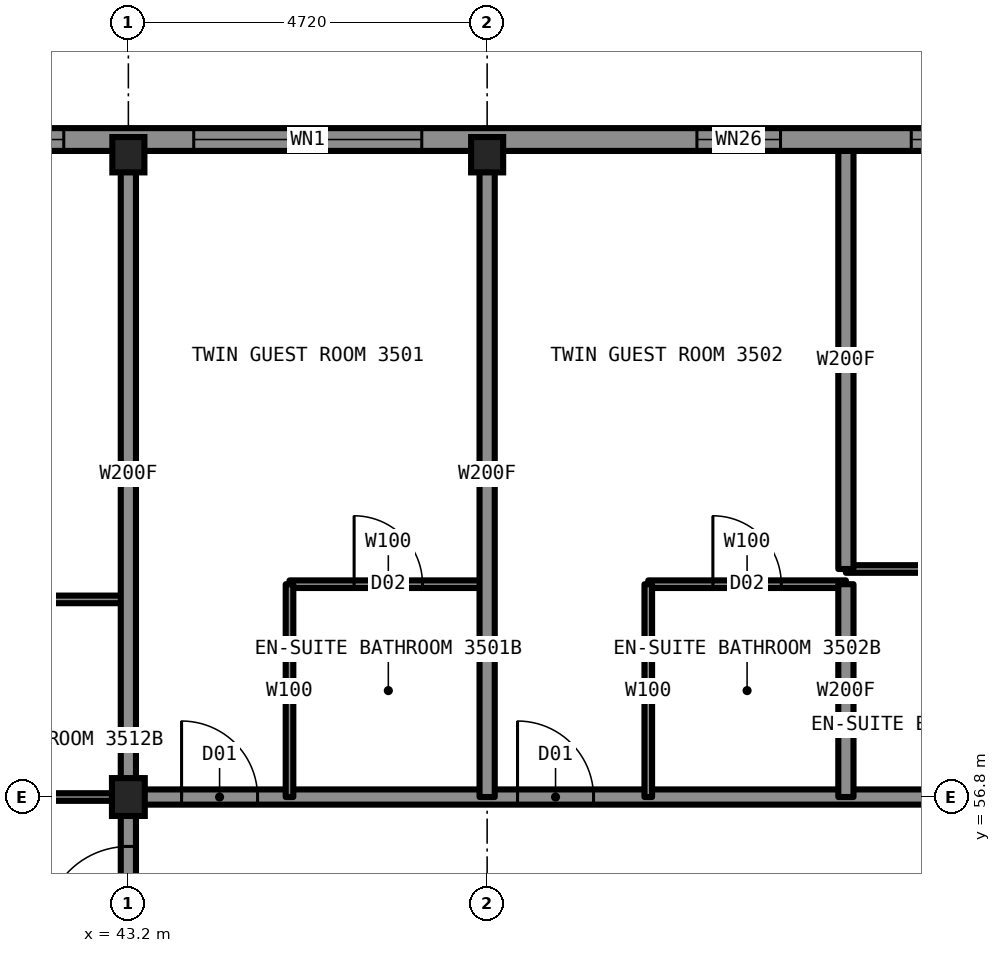
"""IFC4 building model, lengths in metres.
Left out: names, types, materials, properties, quantities, classifications, styles, units other than length and angle.
Written with IfcOpenShell. Run it as: python <this file> out.ifc"""

import sys

from ifc_helpers import new_model, si_unit, direction, frame, frame_2d, origin, origin_2d, place, context, subcontext, project, spatial, rectangle, i_section, extrude, element, fill, save


model = new_model("IFC4")
c1 = context("Model", 3, precision=1e-05, world=origin(), true_north=direction((0.0, 1.0)))
c2 = subcontext(c1, "Body", "Model", "MODEL_VIEW")
j1 = project(units=[si_unit("LENGTHUNIT", "METRE"), si_unit("PLANEANGLEUNIT", "RADIAN")], contexts=[c1])
p1 = place(None, origin())
s1 = spatial("IfcSite", under=j1, at=p1, CompositionType="ELEMENT")
p2 = place(p1, origin())
s2 = spatial("IfcBuilding", under=s1, at=p2, CompositionType="ELEMENT")
p3 = place(p2, frame((0.0, 0.0, 124.9)))
s3 = spatial("IfcBuildingStorey", under=s2, at=p3, CompositionType="ELEMENT", Elevation=124.9)
for number, where, z_axis, x_axis in (
    (1, (43.2, 65.25, 0.0), (0.0, 0.0, 1.0), (1.0, 0.0, 0.0)),
    (2, (47.92, 65.25, 0.0), (0.0, 0.0, 1.0), (1.0, 0.0, 0.0)),
):
    element("IfcColumn", number, at=place(p3, frame(where, z_axis=z_axis, x_axis=x_axis)), inside=s3, PredefinedType="COLUMN", context=c2, shape_type="SweptSolid", body=[
        extrude(i_section(OverallWidth=0.422, OverallDepth=0.465, WebThickness=0.045, FlangeThickness=0.073, at=origin_2d()), origin(), (0.0, 0.0, 1.0), 3.5),
    ])
p4 = place(p3, frame((43.2, 56.8, 0.0), z_axis=(0.0, 0.0, 1.0), x_axis=(1.0, 0.0, 0.0)))
e3 = element("IfcColumn", 3, at=p4, inside=s3, PredefinedType="COLUMN", context=c2, shape_type="SweptSolid", body=[
    extrude(i_section(OverallWidth=0.432, OverallDepth=0.498, WebThickness=0.056, FlangeThickness=0.089, at=origin_2d()), origin(), (0.0, 0.0, 1.0), 3.5),
])
p5 = place(p3, frame((40.6, 56.8, 0.0), z_axis=(0.0, 0.0, 1.0), x_axis=(1.0, 0.0, 0.0)))
e4 = element("IfcWall", 4, at=p5, inside=s3, PredefinedType="PARTITIONING", context=c2, shape_type="SweptSolid", body=[
    extrude(rectangle(XDim=2.6, YDim=0.1, at=frame_2d((1.3, 0.0))), origin(), (0.0, 0.0, 1.0), 2.573),
])
p6 = place(p3, frame((43.2, 56.8, 0.0), z_axis=(0.0, 0.0, 1.0), x_axis=(1.0, 0.0, 0.0)))
e5 = element("IfcWall", 5, at=p6, inside=s3, PredefinedType="PARTITIONING", context=c2, shape_type="SweptSolid", body=[
    extrude(rectangle(XDim=23.6, YDim=0.2, at=frame_2d((11.8, 0.0))), origin(), (0.0, 0.0, 1.0), 3.33),
])
p7 = place(p6, frame((0.7, 0.0, 0.0)))
e6 = element("IfcOpeningElement", 6, at=p7, cuts=e5, PredefinedType="OPENING", context=c2, shape_type="SweptSolid", body=[
    extrude(rectangle(XDim=1.0, YDim=2.2, at=frame_2d((0.5, 1.1))), frame((0.0, 0.11, 0.0), z_axis=(0.0, -1.0, 0.0), x_axis=(1.0, 0.0, 0.0)), (0.0, 0.0, 1.0), 0.22),
])
p8 = place(p6, frame((5.12, 0.0, 0.0)))
e7 = element("IfcOpeningElement", 7, at=p8, cuts=e5, PredefinedType="OPENING", context=c2, shape_type="SweptSolid", body=[
    extrude(rectangle(XDim=1.0, YDim=2.2, at=frame_2d((0.5, 1.1))), frame((0.0, 0.11, 0.0), z_axis=(0.0, -1.0, 0.0), x_axis=(1.0, 0.0, 0.0)), (0.0, 0.0, 1.0), 0.22),
])
p9 = place(p6, frame((12.44, 0.0, 0.0)))
e8 = element("IfcOpeningElement", 8, at=p9, cuts=e5, PredefinedType="OPENING", context=c2, shape_type="SweptSolid", body=[
    extrude(rectangle(XDim=1.0, YDim=2.2, at=frame_2d((0.5, 1.1))), frame((0.0, 0.11, 0.0), z_axis=(0.0, -1.0, 0.0), x_axis=(1.0, 0.0, 0.0)), (0.0, 0.0, 1.0), 0.22),
])
p10 = place(p6, frame((21.14, 0.0, 0.0)))
e9 = element("IfcOpeningElement", 9, at=p10, cuts=e5, PredefinedType="OPENING", context=c2, shape_type="SweptSolid", body=[
    extrude(rectangle(XDim=1.0, YDim=2.2, at=frame_2d((0.5, 1.1))), frame((0.0, 0.11, 0.0), z_axis=(0.0, -1.0, 0.0), x_axis=(1.0, 0.0, 0.0)), (0.0, 0.0, 1.0), 0.22),
])
p11 = place(p3, frame((40.6, 59.4, 0.0), z_axis=(0.0, 0.0, 1.0), x_axis=(1.0, 0.0, 0.0)))
e10 = element("IfcWall", 10, at=p11, inside=s3, PredefinedType="PARTITIONING", context=c2, shape_type="SweptSolid", body=[
    extrude(rectangle(XDim=2.6, YDim=0.1, at=frame_2d((1.3, 0.0))), origin(), (0.0, 0.0, 1.0), 3.33),
])
p12 = place(p3, frame((45.32, 59.6, 0.0), z_axis=(0.0, 0.0, 1.0), x_axis=(1.0, 0.0, 0.0)))
e11 = element("IfcWall", 11, at=p12, inside=s3, PredefinedType="PARTITIONING", context=c2, shape_type="SweptSolid", body=[
    extrude(rectangle(XDim=2.6, YDim=0.1, at=frame_2d((1.3, 0.0))), origin(), (0.0, 0.0, 1.0), 3.33),
])
p13 = place(p12, frame((0.85, 0.0, 0.0)))
e12 = element("IfcOpeningElement", 12, at=p13, cuts=e11, PredefinedType="OPENING", context=c2, shape_type="SweptSolid", body=[
    extrude(rectangle(XDim=0.9, YDim=2.1, at=frame_2d((0.45, 1.05))), frame((0.0, 0.06, 0.0), z_axis=(0.0, -1.0, 0.0), x_axis=(1.0, 0.0, 0.0)), (0.0, 0.0, 1.0), 0.12),
])
p14 = place(p3, frame((50.04, 59.6, 0.0), z_axis=(0.0, 0.0, 1.0), x_axis=(1.0, 0.0, 0.0)))
e13 = element("IfcWall", 13, at=p14, inside=s3, PredefinedType="PARTITIONING", context=c2, shape_type="SweptSolid", body=[
    extrude(rectangle(XDim=2.6, YDim=0.1, at=frame_2d((1.3, 0.0))), origin(), (0.0, 0.0, 1.0), 3.33),
])
p15 = place(p14, frame((0.85, 0.0, 0.0)))
e14 = element("IfcOpeningElement", 14, at=p15, cuts=e13, PredefinedType="OPENING", context=c2, shape_type="SweptSolid", body=[
    extrude(rectangle(XDim=0.9, YDim=2.1, at=frame_2d((0.45, 1.05))), frame((0.0, 0.06, 0.0), z_axis=(0.0, -1.0, 0.0), x_axis=(1.0, 0.0, 0.0)), (0.0, 0.0, 1.0), 0.12),
])
p16 = place(p3, frame((52.64, 59.8, 0.0), z_axis=(0.0, 0.0, 1.0), x_axis=(1.0, 0.0, 0.0)))
e15 = element("IfcWall", 15, at=p16, inside=s3, PredefinedType="PARTITIONING", context=c2, shape_type="SweptSolid", body=[
    extrude(rectangle(XDim=2.6, YDim=0.1, at=frame_2d((1.3, 0.0))), origin(), (0.0, 0.0, 1.0), 3.33),
])
p17 = place(p3, frame((43.2, 33.22, 0.0), z_axis=(0.0, 0.0, 1.0), x_axis=(0.0, 1.0, 0.0)))
e16 = element("IfcWall", 16, at=p17, inside=s3, PredefinedType="PARTITIONING", context=c2, shape_type="SweptSolid", body=[
    extrude(rectangle(XDim=23.58, YDim=0.2, at=frame_2d((11.79, 0.0))), origin(), (0.0, 0.0, 1.0), 3.33),
])
p18 = place(p17, frame((6.16, 0.0, 0.0)))
e17 = element("IfcOpeningElement", 17, at=p18, cuts=e16, PredefinedType="OPENING", context=c2, shape_type="SweptSolid", body=[
    extrude(rectangle(XDim=1.0, YDim=2.2, at=frame_2d((0.5, 1.1))), frame((0.0, 0.11, 0.0), z_axis=(0.0, -1.0, 0.0), x_axis=(1.0, 0.0, 0.0)), (0.0, 0.0, 1.0), 0.22),
])
p19 = place(p17, frame((12.42, 0.0, 0.0)))
e18 = element("IfcOpeningElement", 18, at=p19, cuts=e16, PredefinedType="OPENING", context=c2, shape_type="SweptSolid", body=[
    extrude(rectangle(XDim=1.0, YDim=2.2, at=frame_2d((0.5, 1.1))), frame((0.0, 0.11, 0.0), z_axis=(0.0, -1.0, 0.0), x_axis=(1.0, 0.0, 0.0)), (0.0, 0.0, 1.0), 0.22),
])
p20 = place(p17, frame((21.83, 0.0, 0.0)))
e19 = element("IfcOpeningElement", 19, at=p20, cuts=e16, PredefinedType="OPENING", context=c2, shape_type="SweptSolid", body=[
    extrude(rectangle(XDim=1.1, YDim=2.2, at=frame_2d((0.55, 1.1))), frame((0.0, 0.11, 0.0), z_axis=(0.0, -1.0, 0.0), x_axis=(1.0, 0.0, 0.0)), (0.0, 0.0, 1.0), 0.22),
])
p21 = place(p17, frame((0.63, 0.0, 0.0)))
e20 = element("IfcOpeningElement", 20, at=p21, cuts=e16, PredefinedType="OPENING", context=c2, shape_type="SweptSolid", body=[
    extrude(rectangle(XDim=1.1, YDim=2.2, at=frame_2d((0.55, 1.1))), frame((0.0, 0.11, 0.0), z_axis=(0.0, -1.0, 0.0), x_axis=(1.0, 0.0, 0.0)), (0.0, 0.0, 1.0), 0.22),
])
p22 = place(p3, frame((43.2, 56.8, 0.0), z_axis=(0.0, 0.0, 1.0), x_axis=(0.0, 1.0, 0.0)))
e21 = element("IfcWall", 21, at=p22, inside=s3, PredefinedType="PARTITIONING", context=c2, shape_type="SweptSolid", body=[
    extrude(rectangle(XDim=8.5, YDim=0.2, at=frame_2d((4.25, 0.0))), origin(), (0.0, 0.0, 1.0), 2.573),
])
p23 = place(p3, frame((52.64, 56.8, 0.0), z_axis=(0.0, 0.0, 1.0), x_axis=(0.0, 1.0, 0.0)))
e22 = element("IfcWall", 22, at=p23, inside=s3, PredefinedType="PARTITIONING", context=c2, shape_type="SweptSolid", body=[
    extrude(rectangle(XDim=2.8, YDim=0.2, at=frame_2d((1.4, 0.0))), origin(), (0.0, 0.0, 1.0), 3.33),
])
p24 = place(p3, frame((52.64, 59.8, 0.0), z_axis=(0.0, 0.0, 1.0), x_axis=(0.0, 1.0, 0.0)))
e23 = element("IfcWall", 23, at=p24, inside=s3, PredefinedType="PARTITIONING", context=c2, shape_type="SweptSolid", body=[
    extrude(rectangle(XDim=5.5, YDim=0.2, at=frame_2d((2.75, 0.0))), origin(), (0.0, 0.0, 1.0), 3.33),
])
p25 = place(p3, frame((50.04, 56.8, 0.0), z_axis=(0.0, 0.0, 1.0), x_axis=(0.0, 1.0, 0.0)))
e24 = element("IfcWall", 24, at=p25, inside=s3, PredefinedType="PARTITIONING", context=c2, shape_type="SweptSolid", body=[
    extrude(rectangle(XDim=2.8, YDim=0.1, at=frame_2d((1.4, 0.0))), origin(), (0.0, 0.0, 1.0), 3.33),
])
p26 = place(p3, frame((47.92, 56.8, 0.0), z_axis=(0.0, 0.0, 1.0), x_axis=(0.0, 1.0, 0.0)))
e25 = element("IfcWall", 25, at=p26, inside=s3, PredefinedType="PARTITIONING", context=c2, shape_type="SweptSolid", body=[
    extrude(rectangle(XDim=8.5, YDim=0.2, at=frame_2d((4.25, 0.0))), origin(), (0.0, 0.0, 1.0), 2.573),
])
p27 = place(p3, frame((45.32, 56.8, 0.0), z_axis=(0.0, 0.0, 1.0), x_axis=(0.0, 1.0, 0.0)))
e26 = element("IfcWall", 26, at=p27, inside=s3, PredefinedType="PARTITIONING", context=c2, shape_type="SweptSolid", body=[
    extrude(rectangle(XDim=2.8, YDim=0.1, at=frame_2d((1.4, 0.0))), origin(), (0.0, 0.0, 1.0), 3.33),
])
p28 = place(p3, frame((70.1, 65.45, 0.0), z_axis=(0.0, 0.0, 1.0), x_axis=(-1.0, 0.0, 0.0)))
e27 = element("IfcWall", 27, at=p28, inside=s3, PredefinedType="SOLIDWALL", context=c2, shape_type="SweptSolid", body=[
    extrude(rectangle(XDim=30.2, YDim=0.3, at=frame_2d((15.1, 0.0))), origin(), (0.0, 0.0, 1.0), 2.83),
])
p29 = place(p28, frame((0.85, 0.0, 0.5)))
e28 = element("IfcOpeningElement", 28, at=p29, cuts=e27, PredefinedType="OPENING", context=c2, shape_type="SweptSolid", body=[
    extrude(rectangle(XDim=1.6, YDim=2.0, at=frame_2d((0.8, 1.0))), frame((0.0, 0.16, 0.0), z_axis=(0.0, -1.0, 0.0), x_axis=(1.0, 0.0, 0.0)), (0.0, 0.0, 1.0), 0.32),
])
p30 = place(p28, frame((4.16, 0.0, 0.5)))
e29 = element("IfcOpeningElement", 29, at=p30, cuts=e27, PredefinedType="OPENING", context=c2, shape_type="SweptSolid", body=[
    extrude(rectangle(XDim=3.0, YDim=2.0, at=frame_2d((1.5, 1.0))), frame((0.0, 0.16, 0.0), z_axis=(0.0, -1.0, 0.0), x_axis=(1.0, 0.0, 0.0)), (0.0, 0.0, 1.0), 0.32),
])
p31 = place(p28, frame((8.88, 0.0, 0.5)))
e30 = element("IfcOpeningElement", 30, at=p31, cuts=e27, PredefinedType="OPENING", context=c2, shape_type="SweptSolid", body=[
    extrude(rectangle(XDim=3.0, YDim=2.0, at=frame_2d((1.5, 1.0))), frame((0.0, 0.16, 0.0), z_axis=(0.0, -1.0, 0.0), x_axis=(1.0, 0.0, 0.0)), (0.0, 0.0, 1.0), 0.32),
])
p32 = place(p28, frame((18.32, 0.0, 0.5)))
e31 = element("IfcOpeningElement", 31, at=p32, cuts=e27, PredefinedType="OPENING", context=c2, shape_type="SweptSolid", body=[
    extrude(rectangle(XDim=3.0, YDim=2.0, at=frame_2d((1.5, 1.0))), frame((0.0, 0.16, 0.0), z_axis=(0.0, -1.0, 0.0), x_axis=(1.0, 0.0, 0.0)), (0.0, 0.0, 1.0), 0.32),
])
p33 = place(p28, frame((23.04, 0.0, 0.5)))
e32 = element("IfcOpeningElement", 32, at=p33, cuts=e27, PredefinedType="OPENING", context=c2, shape_type="SweptSolid", body=[
    extrude(rectangle(XDim=3.0, YDim=2.0, at=frame_2d((1.5, 1.0))), frame((0.0, 0.16, 0.0), z_axis=(0.0, -1.0, 0.0), x_axis=(1.0, 0.0, 0.0)), (0.0, 0.0, 1.0), 0.32),
])
p34 = place(p28, frame((27.75, 0.0, 0.5)))
e33 = element("IfcOpeningElement", 33, at=p34, cuts=e27, PredefinedType="OPENING", context=c2, shape_type="SweptSolid", body=[
    extrude(rectangle(XDim=1.6, YDim=2.0, at=frame_2d((0.8, 1.0))), frame((0.0, 0.16, 0.0), z_axis=(0.0, -1.0, 0.0), x_axis=(1.0, 0.0, 0.0)), (0.0, 0.0, 1.0), 0.32),
])
p35 = place(p7, origin())
e34 = element("IfcDoor", 34, at=p35, inside=s3, OperationType="SINGLE_SWING_LEFT", PredefinedType="DOOR", context=c2, shape_type="SweptSolid", body=[
    extrude(rectangle(XDim=1.0, YDim=2.2, at=frame_2d((0.5, 1.1))), frame((0.0, 0.025, 0.0), z_axis=(0.0, -1.0, 0.0), x_axis=(1.0, 0.0, 0.0)), (0.0, 0.0, 1.0), 0.05),
])
fill(e6, e34)
p36 = place(p13, origin())
e35 = element("IfcDoor", 35, at=p36, inside=s3, OperationType="SINGLE_SWING_RIGHT", PredefinedType="DOOR", context=c2, shape_type="SweptSolid", body=[
    extrude(rectangle(XDim=0.9, YDim=2.1, at=frame_2d((0.45, 1.05))), frame((0.0, 0.025, 0.0), z_axis=(0.0, -1.0, 0.0), x_axis=(1.0, 0.0, 0.0)), (0.0, 0.0, 1.0), 0.05),
])
fill(e12, e35)
p37 = place(p8, origin())
e36 = element("IfcDoor", 36, at=p37, inside=s3, OperationType="SINGLE_SWING_LEFT", PredefinedType="DOOR", context=c2, shape_type="SweptSolid", body=[
    extrude(rectangle(XDim=1.0, YDim=2.2, at=frame_2d((0.5, 1.1))), frame((0.0, 0.025, 0.0), z_axis=(0.0, -1.0, 0.0), x_axis=(1.0, 0.0, 0.0)), (0.0, 0.0, 1.0), 0.05),
])
fill(e7, e36)
p38 = place(p15, origin())
e37 = element("IfcDoor", 37, at=p38, inside=s3, OperationType="SINGLE_SWING_RIGHT", PredefinedType="DOOR", context=c2, shape_type="SweptSolid", body=[
    extrude(rectangle(XDim=0.9, YDim=2.1, at=frame_2d((0.45, 1.05))), frame((0.0, 0.025, 0.0), z_axis=(0.0, -1.0, 0.0), x_axis=(1.0, 0.0, 0.0)), (0.0, 0.0, 1.0), 0.05),
])
fill(e14, e37)
p39 = place(p20, origin())
e38 = element("IfcDoor", 38, at=p39, inside=s3, OperationType="SINGLE_SWING_LEFT", PredefinedType="DOOR", context=c2, shape_type="SweptSolid", body=[
    extrude(rectangle(XDim=1.1, YDim=2.2, at=frame_2d((0.55, 1.1))), frame((0.0, 0.025, 0.0), z_axis=(0.0, -1.0, 0.0), x_axis=(1.0, 0.0, 0.0)), (0.0, 0.0, 1.0), 0.05),
])
fill(e19, e38)
p40 = place(p32, origin())
e39 = element("IfcWindow", 39, at=p40, inside=s3, PartitioningType="SINGLE_PANEL", PredefinedType="WINDOW", context=c2, shape_type="SweptSolid", body=[
    extrude(rectangle(XDim=3.0, YDim=2.0, at=frame_2d((1.5, 1.0))), frame((0.0, 0.03, 0.0), z_axis=(0.0, -1.0, 0.0), x_axis=(1.0, 0.0, 0.0)), (0.0, 0.0, 1.0), 0.06),
])
fill(e31, e39)
p41 = place(p33, origin())
e40 = element("IfcWindow", 40, at=p41, inside=s3, PartitioningType="SINGLE_PANEL", PredefinedType="WINDOW", context=c2, shape_type="SweptSolid", body=[
    extrude(rectangle(XDim=3.0, YDim=2.0, at=frame_2d((1.5, 1.0))), frame((0.0, 0.03, 0.0), z_axis=(0.0, -1.0, 0.0), x_axis=(1.0, 0.0, 0.0)), (0.0, 0.0, 1.0), 0.06),
])
fill(e32, e40)
p42 = place(p34, origin())
e41 = element("IfcWindow", 41, at=p42, inside=s3, PartitioningType="SINGLE_PANEL", PredefinedType="WINDOW", context=c2, shape_type="SweptSolid", body=[
    extrude(rectangle(XDim=1.6, YDim=2.0, at=frame_2d((0.8, 1.0))), frame((0.0, 0.03, 0.0), z_axis=(0.0, -1.0, 0.0), x_axis=(1.0, 0.0, 0.0)), (0.0, 0.0, 1.0), 0.06),
])
fill(e33, e41)
save(model, sys.argv[1])
